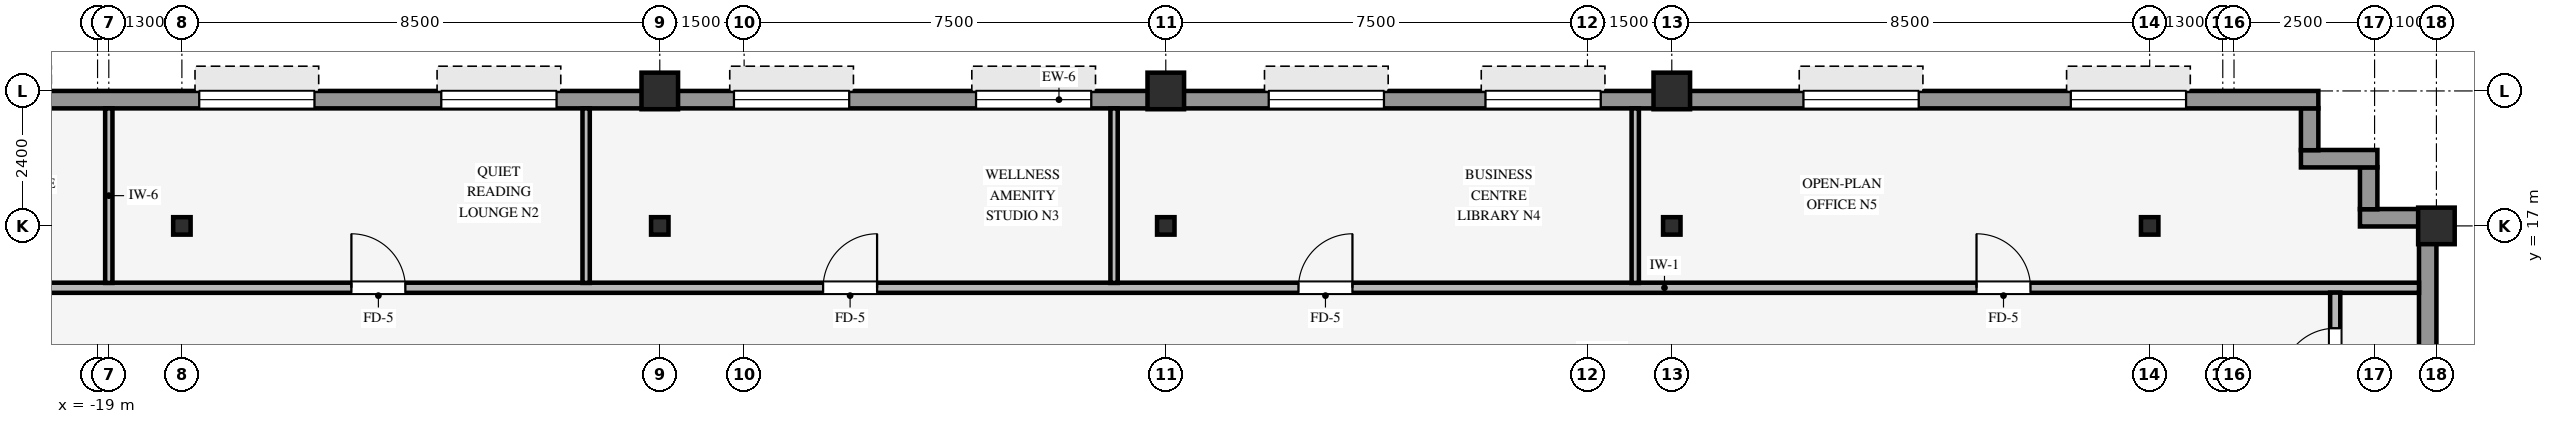
"""IFC4 building model, lengths in metres.
Left out: names, types, materials, properties, quantities, classifications, styles, units other than length and angle.
Written with IfcOpenShell. Run it as: python <this file> out.ifc"""

import sys

from ifc_helpers import new_model, si_unit, direction, frame, frame_2d, origin, origin_2d, place, context, subcontext, project, spatial, rectangle, hollow_rectangle, i_section, extrude, source, transform, mapped, element, fill, save


model = new_model("IFC4")
c1 = context("Model", 3, precision=1e-05, world=origin(), true_north=direction((0.0, 1.0)))
c2 = subcontext(c1, "Body", "Model", "MODEL_VIEW")
j1 = project(units=[si_unit("LENGTHUNIT", "METRE"), si_unit("PLANEANGLEUNIT", "RADIAN")], contexts=[c1])
p1 = place(None, origin())
s1 = spatial("IfcSite", under=j1, at=p1, CompositionType="ELEMENT")
p2 = place(p1, origin())
s2 = spatial("IfcBuilding", under=s1, at=p2, CompositionType="ELEMENT")
p3 = place(p2, frame((0.0, 0.0, 171.3)))
s3 = spatial("IfcBuildingStorey", under=s2, at=p3, CompositionType="ELEMENT", Elevation=171.3)
for number, where, z_axis, x_axis in (
    (1, (22.6, 17.0, 0.0), (0.0, 0.0, 1.0), (1.0, 0.0, 0.0)),
    (2, (-9.0, 19.4, 0.0), (0.0, 0.0, 1.0), (1.0, 0.0, 0.0)),
    (3, (0.0, 19.4, 0.0), (0.0, 0.0, 1.0), (1.0, 0.0, 0.0)),
    (4, (9.0, 19.4, 0.0), (0.0, 0.0, 1.0), (1.0, 0.0, 0.0)),
):
    element("IfcColumn", number, at=place(p3, frame(where, z_axis=z_axis, x_axis=x_axis)), inside=s3, PredefinedType="COLUMN", context=c2, shape_type="SweptSolid", body=[
        extrude(hollow_rectangle(XDim=0.65, YDim=0.65, WallThickness=0.04, InnerFilletRadius=0.04, OuterFilletRadius=0.08, at=origin_2d()), origin(), (0.0, 0.0, 1.0), 3.37),
    ])
for number, where, z_axis, x_axis in (
    (5, (0.0, 17.0, 0.0), (0.0, 0.0, 1.0), (1.0, 0.0, 0.0)),
    (6, (-17.5, 17.0, 0.0), (0.0, 0.0, 1.0), (1.0, 0.0, 0.0)),
    (7, (-9.0, 17.0, 0.0), (0.0, 0.0, 1.0), (1.0, 0.0, 0.0)),
    (8, (9.0, 17.0, 0.0), (0.0, 0.0, 1.0), (1.0, 0.0, 0.0)),
    (9, (17.5, 17.0, 0.0), (0.0, 0.0, 1.0), (1.0, 0.0, 0.0)),
):
    element("IfcColumn", number, at=place(p3, frame(where, z_axis=z_axis, x_axis=x_axis)), inside=s3, PredefinedType="COLUMN", context=c2, shape_type="SweptSolid", body=[
        extrude(i_section(OverallWidth=0.31, OverallDepth=0.31, WebThickness=0.015, FlangeThickness=0.015, FilletRadius=0.015, at=origin_2d()), origin(), (0.0, 0.0, 1.0), 3.37),
    ])
p4 = place(p3, frame((22.445, -20.794, 0.0), z_axis=(0.0, 0.0, 1.0), x_axis=(0.0, 1.0, 0.0)))
e10 = element("IfcWall", 10, at=p4, inside=s3, PredefinedType="STANDARD", context=c2, shape_type="SweptSolid", body=[
    extrude(rectangle(XDim=37.788, YDim=0.31, at=frame_2d((18.894, 0.0))), origin(), (0.0, 0.0, 1.0), 2.705),
])
p5 = place(p4, frame((16.474, 0.0, 0.0), z_axis=(0.0, 0.0, 1.0), x_axis=(-1.0, 0.0, 0.0)))
e11 = element("IfcOpeningElement", 11, at=p5, cuts=e10, PredefinedType="OPENING", context=c2, shape_type="SweptSolid", body=[
    extrude(rectangle(XDim=0.98, YDim=2.15, at=frame_2d((0.49, 1.075))), frame((0.0, 0.165, 0.0), z_axis=(0.0, -1.0, 0.0), x_axis=(1.0, 0.0, 0.0)), (0.0, 0.0, 1.0), 0.33),
])
p6 = place(p4, frame((1.581, 0.0, 0.8)))
e12 = element("IfcOpeningElement", 12, at=p6, cuts=e10, PredefinedType="OPENING", context=c2, shape_type="SweptSolid", body=[
    extrude(rectangle(XDim=1.25, YDim=1.52, at=frame_2d((0.625, 0.76))), frame((0.0, 0.165, 0.0), z_axis=(0.0, -1.0, 0.0), x_axis=(1.0, 0.0, 0.0)), (0.0, 0.0, 1.0), 0.33),
])
p7 = place(p4, frame((8.044, 0.0, 0.8)))
e13 = element("IfcOpeningElement", 13, at=p7, cuts=e10, PredefinedType="OPENING", context=c2, shape_type="SweptSolid", body=[
    extrude(rectangle(XDim=1.25, YDim=1.52, at=frame_2d((0.625, 0.76))), frame((0.0, 0.165, 0.0), z_axis=(0.0, -1.0, 0.0), x_axis=(1.0, 0.0, 0.0)), (0.0, 0.0, 1.0), 0.33),
])
p8 = place(p4, frame((13.156, 0.0, 0.8)))
e14 = element("IfcOpeningElement", 14, at=p8, cuts=e10, PredefinedType="OPENING", context=c2, shape_type="SweptSolid", body=[
    extrude(rectangle(XDim=1.25, YDim=1.52, at=frame_2d((0.625, 0.76))), frame((0.0, 0.165, 0.0), z_axis=(0.0, -1.0, 0.0), x_axis=(1.0, 0.0, 0.0)), (0.0, 0.0, 1.0), 0.33),
])
p9 = place(p4, frame((18.269, 0.0, 0.8)))
e15 = element("IfcOpeningElement", 15, at=p9, cuts=e10, PredefinedType="OPENING", context=c2, shape_type="SweptSolid", body=[
    extrude(rectangle(XDim=1.25, YDim=1.52, at=frame_2d((0.625, 0.76))), frame((0.0, 0.165, 0.0), z_axis=(0.0, -1.0, 0.0), x_axis=(1.0, 0.0, 0.0)), (0.0, 0.0, 1.0), 0.33),
])
p10 = place(p4, frame((23.382, 0.0, 0.8)))
e16 = element("IfcOpeningElement", 16, at=p10, cuts=e10, PredefinedType="OPENING", context=c2, shape_type="SweptSolid", body=[
    extrude(rectangle(XDim=1.25, YDim=1.52, at=frame_2d((0.625, 0.76))), frame((0.0, 0.165, 0.0), z_axis=(0.0, -1.0, 0.0), x_axis=(1.0, 0.0, 0.0)), (0.0, 0.0, 1.0), 0.33),
])
p11 = place(p4, frame((28.044, 0.0, 0.8)))
e17 = element("IfcOpeningElement", 17, at=p11, cuts=e10, PredefinedType="OPENING", context=c2, shape_type="SweptSolid", body=[
    extrude(rectangle(XDim=1.25, YDim=1.52, at=frame_2d((0.625, 0.76))), frame((0.0, 0.165, 0.0), z_axis=(0.0, -1.0, 0.0), x_axis=(1.0, 0.0, 0.0)), (0.0, 0.0, 1.0), 0.33),
])
p12 = place(p4, frame((33.607, 0.0, 0.8)))
e18 = element("IfcOpeningElement", 18, at=p12, cuts=e10, PredefinedType="OPENING", context=c2, shape_type="SweptSolid", body=[
    extrude(rectangle(XDim=1.25, YDim=1.52, at=frame_2d((0.625, 0.76))), frame((0.0, 0.165, 0.0), z_axis=(0.0, -1.0, 0.0), x_axis=(1.0, 0.0, 0.0)), (0.0, 0.0, 1.0), 0.33),
])
p13 = place(p3, frame((21.24, 17.145, 0.0), z_axis=(0.0, 0.0, 1.0), x_axis=(1.0, 0.0, 0.0)))
e19 = element("IfcWall", 19, at=p13, inside=s3, PredefinedType="STANDARD", context=c2, shape_type="SweptSolid", body=[
    extrude(rectangle(XDim=1.36, YDim=0.31, at=frame_2d((0.68, 0.0))), origin(), (0.0, 0.0, 1.0), 2.816),
])
p14 = place(p3, frame((21.395, 17.296, 0.0), z_axis=(0.0, 0.0, 1.0), x_axis=(0.0, 1.0, 0.0)))
e20 = element("IfcWall", 20, at=p14, inside=s3, PredefinedType="STANDARD", context=c2, shape_type="SweptSolid", body=[
    extrude(rectangle(XDim=0.748, YDim=0.31, at=frame_2d((0.374, 0.0))), origin(), (0.0, 0.0, 1.0), 2.816),
])
p15 = place(p3, frame((20.19, 18.195, 0.0), z_axis=(0.0, 0.0, 1.0), x_axis=(1.0, 0.0, 0.0)))
e21 = element("IfcWall", 21, at=p15, inside=s3, PredefinedType="STANDARD", context=c2, shape_type="SweptSolid", body=[
    extrude(rectangle(XDim=1.36, YDim=0.31, at=frame_2d((0.68, 0.0))), origin(), (0.0, 0.0, 1.0), 2.816),
])
p16 = place(p3, frame((20.345, 18.346, 0.0), z_axis=(0.0, 0.0, 1.0), x_axis=(0.0, 1.0, 0.0)))
e22 = element("IfcWall", 22, at=p16, inside=s3, PredefinedType="STANDARD", context=c2, shape_type="SweptSolid", body=[
    extrude(rectangle(XDim=0.748, YDim=0.31, at=frame_2d((0.374, 0.0))), origin(), (0.0, 0.0, 1.0), 2.816),
])
p17 = place(p3, frame((-24.3, 19.245, 0.0), z_axis=(0.0, 0.0, 1.0), x_axis=(1.0, 0.0, 0.0)))
e23 = element("IfcWall", 23, at=p17, inside=s3, PredefinedType="STANDARD", context=c2, shape_type="SweptSolid", body=[
    extrude(rectangle(XDim=44.8, YDim=0.31, at=frame_2d((22.4, 0.0))), origin(), (0.0, 0.0, 1.0), 2.705),
])
p18 = place(p17, frame((2.353, 0.0, 0.8)))
e24 = element("IfcOpeningElement", 24, at=p18, cuts=e23, PredefinedType="OPENING", context=c2, shape_type="SweptSolid", body=[
    extrude(rectangle(XDim=2.05, YDim=1.52, at=frame_2d((1.025, 0.76))), frame((0.0, 0.165, 0.0), z_axis=(0.0, -1.0, 0.0), x_axis=(1.0, 0.0, 0.0)), (0.0, 0.0, 1.0), 0.33),
])
p19 = place(p17, frame((7.108, 0.0, 0.8)))
e25 = element("IfcOpeningElement", 25, at=p19, cuts=e23, PredefinedType="OPENING", context=c2, shape_type="SweptSolid", body=[
    extrude(rectangle(XDim=2.05, YDim=1.52, at=frame_2d((1.025, 0.76))), frame((0.0, 0.165, 0.0), z_axis=(0.0, -1.0, 0.0), x_axis=(1.0, 0.0, 0.0)), (0.0, 0.0, 1.0), 0.33),
])
p20 = place(p17, frame((11.414, 0.0, 0.8)))
e26 = element("IfcOpeningElement", 26, at=p20, cuts=e23, PredefinedType="OPENING", context=c2, shape_type="SweptSolid", body=[
    extrude(rectangle(XDim=2.05, YDim=1.52, at=frame_2d((1.025, 0.76))), frame((0.0, 0.165, 0.0), z_axis=(0.0, -1.0, 0.0), x_axis=(1.0, 0.0, 0.0)), (0.0, 0.0, 1.0), 0.33),
])
p21 = place(p17, frame((16.619, 0.0, 0.8)))
e27 = element("IfcOpeningElement", 27, at=p21, cuts=e23, PredefinedType="OPENING", context=c2, shape_type="SweptSolid", body=[
    extrude(rectangle(XDim=2.05, YDim=1.52, at=frame_2d((1.025, 0.76))), frame((0.0, 0.165, 0.0), z_axis=(0.0, -1.0, 0.0), x_axis=(1.0, 0.0, 0.0)), (0.0, 0.0, 1.0), 0.33),
])
p22 = place(p17, frame((20.925, 0.0, 0.8)))
e28 = element("IfcOpeningElement", 28, at=p22, cuts=e23, PredefinedType="OPENING", context=c2, shape_type="SweptSolid", body=[
    extrude(rectangle(XDim=2.05, YDim=1.52, at=frame_2d((1.025, 0.76))), frame((0.0, 0.165, 0.0), z_axis=(0.0, -1.0, 0.0), x_axis=(1.0, 0.0, 0.0)), (0.0, 0.0, 1.0), 0.33),
])
p23 = place(p17, frame((26.131, 0.0, 0.8)))
e29 = element("IfcOpeningElement", 29, at=p23, cuts=e23, PredefinedType="OPENING", context=c2, shape_type="SweptSolid", body=[
    extrude(rectangle(XDim=2.05, YDim=1.52, at=frame_2d((1.025, 0.76))), frame((0.0, 0.165, 0.0), z_axis=(0.0, -1.0, 0.0), x_axis=(1.0, 0.0, 0.0)), (0.0, 0.0, 1.0), 0.33),
])
p24 = place(p17, frame((29.986, 0.0, 0.8)))
e30 = element("IfcOpeningElement", 30, at=p24, cuts=e23, PredefinedType="OPENING", context=c2, shape_type="SweptSolid", body=[
    extrude(rectangle(XDim=2.05, YDim=1.52, at=frame_2d((1.025, 0.76))), frame((0.0, 0.165, 0.0), z_axis=(0.0, -1.0, 0.0), x_axis=(1.0, 0.0, 0.0)), (0.0, 0.0, 1.0), 0.33),
])
p25 = place(p17, frame((35.642, 0.0, 0.8)))
e31 = element("IfcOpeningElement", 31, at=p25, cuts=e23, PredefinedType="OPENING", context=c2, shape_type="SweptSolid", body=[
    extrude(rectangle(XDim=2.05, YDim=1.52, at=frame_2d((1.025, 0.76))), frame((0.0, 0.165, 0.0), z_axis=(0.0, -1.0, 0.0), x_axis=(1.0, 0.0, 0.0)), (0.0, 0.0, 1.0), 0.33),
])
p26 = place(p17, frame((40.397, 0.0, 0.8)))
e32 = element("IfcOpeningElement", 32, at=p26, cuts=e23, PredefinedType="OPENING", context=c2, shape_type="SweptSolid", body=[
    extrude(rectangle(XDim=2.05, YDim=1.52, at=frame_2d((1.025, 0.76))), frame((0.0, 0.165, 0.0), z_axis=(0.0, -1.0, 0.0), x_axis=(1.0, 0.0, 0.0)), (0.0, 0.0, 1.0), 0.33),
])
p27 = place(p3, frame((-26.09, 15.9, 0.0), z_axis=(0.0, 0.0, 1.0), x_axis=(1.0, 0.0, 0.0)))
e33 = element("IfcWall", 33, at=p27, inside=s3, PredefinedType="PARTITIONING", context=c2, shape_type="SweptSolid", body=[
    extrude(rectangle(XDim=48.38, YDim=0.18, at=frame_2d((24.19, 0.0))), origin(), (0.0, 0.0, 1.0), 3.36),
])
p28 = place(p27, frame((40.51, 0.0, 0.0)))
e34 = element("IfcOpeningElement", 34, at=p28, cuts=e33, PredefinedType="OPENING", context=c2, shape_type="SweptSolid", body=[
    extrude(rectangle(XDim=0.96, YDim=2.1, at=frame_2d((0.48, 1.05))), frame((0.0, 0.1, 0.0), z_axis=(0.0, -1.0, 0.0), x_axis=(1.0, 0.0, 0.0)), (0.0, 0.0, 1.0), 0.2),
])
p29 = place(p27, frame((19.995, 0.0, 0.0)))
e35 = element("IfcOpeningElement", 35, at=p29, cuts=e33, PredefinedType="OPENING", context=c2, shape_type="SweptSolid", body=[
    extrude(rectangle(XDim=0.96, YDim=2.1, at=frame_2d((0.48, 1.05))), frame((0.0, 0.1, 0.0), z_axis=(0.0, -1.0, 0.0), x_axis=(1.0, 0.0, 0.0)), (0.0, 0.0, 1.0), 0.2),
])
p30 = place(p27, frame((28.45, 0.0, 0.0)))
e36 = element("IfcOpeningElement", 36, at=p30, cuts=e33, PredefinedType="OPENING", context=c2, shape_type="SweptSolid", body=[
    extrude(rectangle(XDim=0.96, YDim=2.1, at=frame_2d((0.48, 1.05))), frame((0.0, 0.1, 0.0), z_axis=(0.0, -1.0, 0.0), x_axis=(1.0, 0.0, 0.0)), (0.0, 0.0, 1.0), 0.2),
])
p31 = place(p27, frame((11.605, 0.0, 0.0)))
e37 = element("IfcOpeningElement", 37, at=p31, cuts=e33, PredefinedType="OPENING", context=c2, shape_type="SweptSolid", body=[
    extrude(rectangle(XDim=0.96, YDim=2.1, at=frame_2d((0.48, 1.05))), frame((0.0, 0.1, 0.0), z_axis=(0.0, -1.0, 0.0), x_axis=(1.0, 0.0, 0.0)), (0.0, 0.0, 1.0), 0.2),
])
p32 = place(p27, frame((2.465, 0.0, 0.0)))
e38 = element("IfcOpeningElement", 38, at=p32, cuts=e33, PredefinedType="OPENING", context=c2, shape_type="SweptSolid", body=[
    extrude(rectangle(XDim=0.96, YDim=2.1, at=frame_2d((0.48, 1.05))), frame((0.0, 0.1, 0.0), z_axis=(0.0, -1.0, 0.0), x_axis=(1.0, 0.0, 0.0)), (0.0, 0.0, 1.0), 0.2),
])
for number, where, z_axis, x_axis in (
    (39, (-18.8, 15.986, 0.0), (0.0, 0.0, 1.0), (0.0, 1.0, 0.0)),
    (40, (-10.31, 15.986, 0.0), (0.0, 0.0, 1.0), (0.0, 1.0, 0.0)),
    (41, (-0.92, 15.986, 0.0), (0.0, 0.0, 1.0), (0.0, 1.0, 0.0)),
    (42, (8.35, 15.986, 0.0), (0.0, 0.0, 1.0), (0.0, 1.0, 0.0)),
):
    element("IfcWall", number, at=place(p3, frame(where, z_axis=z_axis, x_axis=x_axis)), inside=s3, PredefinedType="PARTITIONING", context=c2, shape_type="SweptSolid", body=[
        extrude(rectangle(XDim=3.104, YDim=0.13, at=frame_2d((1.552, 0.0))), origin(), (0.0, 0.0, 1.0), 3.36),
    ])
p33 = place(p3, frame((20.8, 13.586, 0.0), z_axis=(0.0, 0.0, 1.0), x_axis=(0.0, 1.0, 0.0)))
e43 = element("IfcWall", 43, at=p33, inside=s3, PredefinedType="PARTITIONING", context=c2, shape_type="SweptSolid", body=[
    extrude(rectangle(XDim=2.228, YDim=0.18, at=frame_2d((1.114, 0.0))), origin(), (0.0, 0.0, 1.0), 3.36),
])
p34 = place(p33, frame((0.634, 0.0, 0.0)))
e44 = element("IfcOpeningElement", 44, at=p34, cuts=e43, PredefinedType="OPENING", context=c2, shape_type="SweptSolid", body=[
    extrude(rectangle(XDim=0.96, YDim=2.1, at=frame_2d((0.48, 1.05))), frame((0.0, 0.1, 0.0), z_axis=(0.0, -1.0, 0.0), x_axis=(1.0, 0.0, 0.0)), (0.0, 0.0, 1.0), 0.2),
])
m1 = source(origin(), c2, "Body", "SweptSolid", [
    extrude(rectangle(XDim=2.05, YDim=1.52, at=frame_2d((1.025, 0.76))), frame((0.0, 0.03, 0.0), z_axis=(0.0, -1.0, 0.0), x_axis=(1.0, 0.0, 0.0)), (0.0, 0.0, 1.0), 0.06),
])
p35 = place(p19, origin())
e45 = element("IfcWindow", 45, at=p35, inside=s3, PartitioningType="SINGLE_PANEL", PredefinedType="WINDOW", context=c2, shape_type="MappedRepresentation", body=[
    mapped(m1, transform((0.0, 0.0, 0.0), scale=1.0)),
])
fill(e25, e45)
p36 = place(p20, origin())
e46 = element("IfcWindow", 46, at=p36, inside=s3, PartitioningType="SINGLE_PANEL", PredefinedType="WINDOW", context=c2, shape_type="MappedRepresentation", body=[
    mapped(m1, transform((0.0, 0.0, 0.0), scale=1.0)),
])
fill(e26, e46)
p37 = place(p21, origin())
e47 = element("IfcWindow", 47, at=p37, inside=s3, PartitioningType="SINGLE_PANEL", PredefinedType="WINDOW", context=c2, shape_type="MappedRepresentation", body=[
    mapped(m1, transform((0.0, 0.0, 0.0), scale=1.0)),
])
fill(e27, e47)
p38 = place(p22, origin())
e48 = element("IfcWindow", 48, at=p38, inside=s3, PartitioningType="SINGLE_PANEL", PredefinedType="WINDOW", context=c2, shape_type="MappedRepresentation", body=[
    mapped(m1, transform((0.0, 0.0, 0.0), scale=1.0)),
])
fill(e28, e48)
p39 = place(p23, origin())
e49 = element("IfcWindow", 49, at=p39, inside=s3, PartitioningType="SINGLE_PANEL", PredefinedType="WINDOW", context=c2, shape_type="MappedRepresentation", body=[
    mapped(m1, transform((0.0, 0.0, 0.0), scale=1.0)),
])
fill(e29, e49)
p40 = place(p24, origin())
e50 = element("IfcWindow", 50, at=p40, inside=s3, PartitioningType="SINGLE_PANEL", PredefinedType="WINDOW", context=c2, shape_type="MappedRepresentation", body=[
    mapped(m1, transform((0.0, 0.0, 0.0), scale=1.0)),
])
fill(e30, e50)
p41 = place(p25, origin())
e51 = element("IfcWindow", 51, at=p41, inside=s3, PartitioningType="SINGLE_PANEL", PredefinedType="WINDOW", context=c2, shape_type="MappedRepresentation", body=[
    mapped(m1, transform((0.0, 0.0, 0.0), scale=1.0)),
])
fill(e31, e51)
p42 = place(p26, origin())
e52 = element("IfcWindow", 52, at=p42, inside=s3, PartitioningType="SINGLE_PANEL", PredefinedType="WINDOW", context=c2, shape_type="MappedRepresentation", body=[
    mapped(m1, transform((0.0, 0.0, 0.0), scale=1.0)),
])
fill(e32, e52)
m2 = source(origin(), c2, "Body", "SweptSolid", [
    extrude(rectangle(XDim=0.96, YDim=2.1, at=frame_2d((0.48, 1.05))), frame((0.0, 0.025, 0.0), z_axis=(0.0, -1.0, 0.0), x_axis=(1.0, 0.0, 0.0)), (0.0, 0.0, 1.0), 0.05),
])
p43 = place(p28, origin())
e53 = element("IfcDoor", 53, at=p43, inside=s3, OperationType="SINGLE_SWING_LEFT", PredefinedType="DOOR", context=c2, shape_type="MappedRepresentation", body=[
    mapped(m2, transform((0.0, 0.0, 0.0), scale=1.0)),
])
fill(e34, e53)
p44 = place(p29, origin())
e54 = element("IfcDoor", 54, at=p44, inside=s3, OperationType="SINGLE_SWING_RIGHT", PredefinedType="DOOR", context=c2, shape_type="MappedRepresentation", body=[
    mapped(m2, transform((0.0, 0.0, 0.0), scale=1.0)),
])
fill(e35, e54)
p45 = place(p30, origin())
e55 = element("IfcDoor", 55, at=p45, inside=s3, OperationType="SINGLE_SWING_RIGHT", PredefinedType="DOOR", context=c2, shape_type="MappedRepresentation", body=[
    mapped(m2, transform((0.0, 0.0, 0.0), scale=1.0)),
])
fill(e36, e55)
p46 = place(p31, origin())
e56 = element("IfcDoor", 56, at=p46, inside=s3, OperationType="SINGLE_SWING_LEFT", PredefinedType="DOOR", context=c2, shape_type="MappedRepresentation", body=[
    mapped(m2, transform((0.0, 0.0, 0.0), scale=1.0)),
])
fill(e37, e56)
p47 = place(p34, origin())
e57 = element("IfcDoor", 57, at=p47, inside=s3, OperationType="SINGLE_SWING_LEFT", PredefinedType="DOOR", context=c2, shape_type="MappedRepresentation", body=[
    mapped(m2, transform((0.0, 0.0, 0.0), scale=1.0)),
])
fill(e44, e57)
save(model, sys.argv[1])
